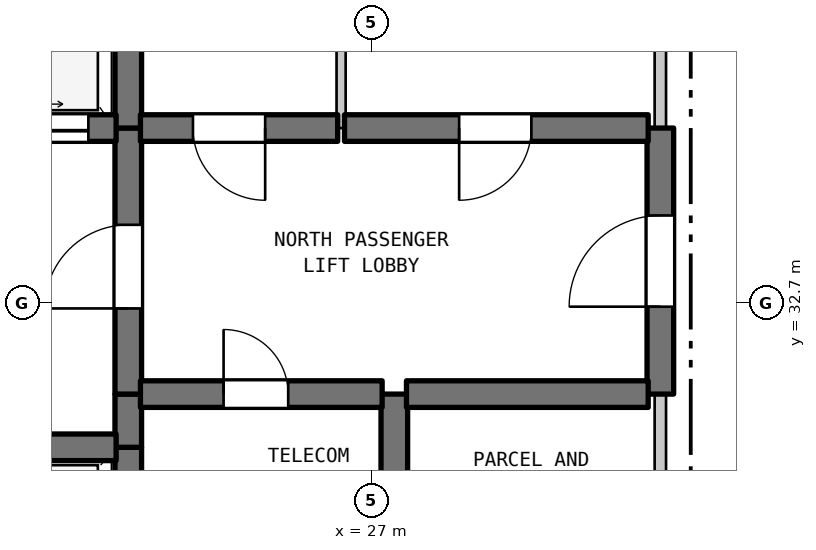
"""IFC4 building model, lengths in metres.
Left out: names, types, materials, properties, quantities, classifications, styles, units other than length and angle.
Written with IfcOpenShell. Run it as: python <this file> out.ifc"""

import sys

from ifc_helpers import new_model, si_unit, direction, frame, frame_2d, origin, place, context, subcontext, project, spatial, rectangle, extrude, element, fill, save


model = new_model("IFC4")
c1 = context("Model", 3, precision=1e-05, world=origin(), true_north=direction((0.0, 1.0)))
c2 = subcontext(c1, "Body", "Model", "MODEL_VIEW")
j1 = project(units=[si_unit("LENGTHUNIT", "METRE"), si_unit("PLANEANGLEUNIT", "RADIAN")], contexts=[c1])
p1 = place(None, origin())
s1 = spatial("IfcSite", under=j1, at=p1, CompositionType="ELEMENT")
p2 = place(p1, origin())
s2 = spatial("IfcBuilding", under=s1, at=p2, CompositionType="ELEMENT")
p3 = place(p2, frame((0.0, 0.0, 291.7)))
s3 = spatial("IfcBuildingStorey", under=s2, at=p3, CompositionType="ELEMENT", Elevation=291.7)
p4 = place(p3, frame((23.8, 28.2, 0.0), z_axis=(0.0, 0.0, 1.0), x_axis=(0.0, 1.0, 0.0)))
e1 = element("IfcWall", 1, at=p4, inside=s3, PredefinedType="SHEAR", context=c2, shape_type="SweptSolid", body=[
    extrude(rectangle(XDim=2.6, YDim=0.35, at=frame_2d((1.3, 0.0))), origin(), (0.0, 0.0, 1.0), 3.39),
])
p5 = place(p3, frame((23.8, 30.8, 0.0), z_axis=(0.0, 0.0, 1.0), x_axis=(0.0, 1.0, 0.0)))
e2 = element("IfcWall", 2, at=p5, inside=s3, PredefinedType="SHEAR", context=c2, shape_type="SweptSolid", body=[
    extrude(rectangle(XDim=0.7, YDim=0.35, at=frame_2d((0.35, 0.0))), origin(), (0.0, 0.0, 1.0), 3.39),
])
p6 = place(p3, frame((23.8, 31.5, 0.0), z_axis=(0.0, 0.0, 1.0), x_axis=(0.0, 1.0, 0.0)))
e3 = element("IfcWall", 3, at=p6, inside=s3, PredefinedType="SHEAR", context=c2, shape_type="SweptSolid", body=[
    extrude(rectangle(XDim=3.5, YDim=0.35, at=frame_2d((1.75, 0.0))), origin(), (0.0, 0.0, 1.0), 3.39),
])
p7 = place(p6, frame((1.127, 0.0, 0.0)))
e4 = element("IfcOpeningElement", 4, at=p7, cuts=e3, PredefinedType="OPENING", context=c2, shape_type="SweptSolid", body=[
    extrude(rectangle(XDim=1.1, YDim=2.15, at=frame_2d((0.55, 1.075))), frame((0.0, 0.185, 0.0), z_axis=(0.0, -1.0, 0.0), x_axis=(1.0, 0.0, 0.0)), (0.0, 0.0, 1.0), 0.37),
])
p8 = place(p3, frame((23.8, 35.0, 0.0), z_axis=(0.0, 0.0, 1.0), x_axis=(0.0, 1.0, 0.0)))
e5 = element("IfcWall", 5, at=p8, inside=s3, PredefinedType="SHEAR", context=c2, shape_type="SweptSolid", body=[
    extrude(rectangle(XDim=2.9, YDim=0.35, at=frame_2d((1.45, 0.0))), origin(), (0.0, 0.0, 1.0), 3.39),
])
p9 = place(p3, frame((26.6, 35.0, 0.0), z_axis=(0.0, 0.0, 1.0), x_axis=(0.0, 1.0, 0.0)))
e6 = element("IfcWall", 6, at=p9, inside=s3, PredefinedType="PARTITIONING", context=c2, shape_type="SweptSolid", body=[
    extrude(rectangle(XDim=2.9, YDim=0.12, at=frame_2d((1.45, 0.0))), origin(), (0.0, 0.0, 1.0), 3.39),
])
p10 = place(p3, frame((27.3, 28.9, 0.0), z_axis=(0.0, 0.0, 1.0), x_axis=(0.0, 1.0, 0.0)))
e7 = element("IfcWall", 7, at=p10, inside=s3, PredefinedType="SHEAR", context=c2, shape_type="SweptSolid", body=[
    extrude(rectangle(XDim=2.6, YDim=0.35, at=frame_2d((1.3, 0.0))), origin(), (0.0, 0.0, 1.0), 3.39),
])
p11 = place(p3, frame((30.8, 28.9, 0.0), z_axis=(0.0, 0.0, 1.0), x_axis=(0.0, 1.0, 0.0)))
e8 = element("IfcWall", 8, at=p11, inside=s3, PredefinedType="STANDARD", context=c2, shape_type="SweptSolid", body=[
    extrude(rectangle(XDim=2.6, YDim=0.15, at=frame_2d((1.3, 0.0))), origin(), (0.0, 0.0, 1.0), 3.39),
])
p12 = place(p3, frame((30.8, 31.5, 0.0), z_axis=(0.0, 0.0, 1.0), x_axis=(0.0, 1.0, 0.0)))
e9 = element("IfcWall", 9, at=p12, inside=s3, PredefinedType="SHEAR", context=c2, shape_type="SweptSolid", body=[
    extrude(rectangle(XDim=3.5, YDim=0.35, at=frame_2d((1.75, 0.0))), origin(), (0.0, 0.0, 1.0), 3.39),
])
p13 = place(p12, frame((1.15, 0.0, 0.0)))
e10 = element("IfcOpeningElement", 10, at=p13, cuts=e9, PredefinedType="OPENING", context=c2, shape_type="SweptSolid", body=[
    extrude(rectangle(XDim=1.2, YDim=2.2, at=frame_2d((0.6, 1.1))), frame((0.0, 0.185, 0.0), z_axis=(0.0, -1.0, 0.0), x_axis=(1.0, 0.0, 0.0)), (0.0, 0.0, 1.0), 0.37),
])
p14 = place(p3, frame((30.8, 35.0, 0.0), z_axis=(0.0, 0.0, 1.0), x_axis=(0.0, 1.0, 0.0)))
e11 = element("IfcWall", 11, at=p14, inside=s3, PredefinedType="STANDARD", context=c2, shape_type="SweptSolid", body=[
    extrude(rectangle(XDim=2.9, YDim=0.15, at=frame_2d((1.45, 0.0))), origin(), (0.0, 0.0, 1.0), 3.39),
])
p15 = place(p3, frame((19.16, 30.8, 0.0), z_axis=(0.0, 0.0, 1.0), x_axis=(1.0, 0.0, 0.0)))
e12 = element("IfcWall", 12, at=p15, inside=s3, PredefinedType="SHEAR", context=c2, shape_type="SweptSolid", body=[
    extrude(rectangle(XDim=4.48, YDim=0.35, at=frame_2d((2.24, 0.0))), origin(), (0.0, 0.0, 1.0), 3.39),
])
p16 = place(p3, frame((23.96, 31.5, 0.0), z_axis=(0.0, 0.0, 1.0), x_axis=(1.0, 0.0, 0.0)))
e13 = element("IfcWall", 13, at=p16, inside=s3, PredefinedType="SHEAR", context=c2, shape_type="SweptSolid", body=[
    extrude(rectangle(XDim=3.18, YDim=0.35, at=frame_2d((1.59, 0.0))), origin(), (0.0, 0.0, 1.0), 3.39),
])
p17 = place(p16, frame((1.094, 0.0, 0.0)))
e14 = element("IfcOpeningElement", 14, at=p17, cuts=e13, PredefinedType="OPENING", context=c2, shape_type="SweptSolid", body=[
    extrude(rectangle(XDim=0.85, YDim=2.1, at=frame_2d((0.425, 1.05))), frame((0.0, 0.185, 0.0), z_axis=(0.0, -1.0, 0.0), x_axis=(1.0, 0.0, 0.0)), (0.0, 0.0, 1.0), 0.37),
])
p18 = place(p3, frame((27.46, 31.5, 0.0), z_axis=(0.0, 0.0, 1.0), x_axis=(1.0, 0.0, 0.0)))
e15 = element("IfcWall", 15, at=p18, inside=s3, PredefinedType="SHEAR", context=c2, shape_type="SweptSolid", body=[
    extrude(rectangle(XDim=3.18, YDim=0.35, at=frame_2d((1.59, 0.0))), origin(), (0.0, 0.0, 1.0), 3.39),
])
p19 = place(p3, frame((19.16, 35.0, 0.0), z_axis=(0.0, 0.0, 1.0), x_axis=(1.0, 0.0, 0.0)))
e16 = element("IfcWall", 16, at=p19, inside=s3, PredefinedType="SHEAR", context=c2, shape_type="SweptSolid", body=[
    extrude(rectangle(XDim=4.48, YDim=0.35, at=frame_2d((2.24, 0.0))), origin(), (0.0, 0.0, 1.0), 3.39),
])
p20 = place(p19, frame((0.365, 0.0, 0.0)))
e17 = element("IfcOpeningElement", 17, at=p20, cuts=e16, PredefinedType="OPENING", context=c2, shape_type="SweptSolid", body=[
    extrude(rectangle(XDim=1.35, YDim=2.2, at=frame_2d((0.675, 1.1))), frame((0.0, 0.185, 0.0), z_axis=(0.0, -1.0, 0.0), x_axis=(1.0, 0.0, 0.0)), (0.0, 0.0, 1.0), 0.37),
])
p21 = place(p19, frame((2.765, 0.0, 0.0)))
e18 = element("IfcOpeningElement", 18, at=p21, cuts=e16, PredefinedType="OPENING", context=c2, shape_type="SweptSolid", body=[
    extrude(rectangle(XDim=1.35, YDim=2.2, at=frame_2d((0.675, 1.1))), frame((0.0, 0.185, 0.0), z_axis=(0.0, -1.0, 0.0), x_axis=(1.0, 0.0, 0.0)), (0.0, 0.0, 1.0), 0.37),
])
p22 = place(p3, frame((23.96, 35.0, 0.0), z_axis=(0.0, 0.0, 1.0), x_axis=(1.0, 0.0, 0.0)))
e19 = element("IfcWall", 19, at=p22, inside=s3, PredefinedType="SHEAR", context=c2, shape_type="SweptSolid", body=[
    extrude(rectangle(XDim=2.595, YDim=0.35, at=frame_2d((1.297, 0.0))), origin(), (0.0, 0.0, 1.0), 3.39),
])
p23 = place(p22, frame((0.691, 0.0, 0.0)))
e20 = element("IfcOpeningElement", 20, at=p23, cuts=e19, PredefinedType="OPENING", context=c2, shape_type="SweptSolid", body=[
    extrude(rectangle(XDim=0.95, YDim=2.15, at=frame_2d((0.475, 1.075))), frame((0.0, 0.185, 0.0), z_axis=(0.0, -1.0, 0.0), x_axis=(1.0, 0.0, 0.0)), (0.0, 0.0, 1.0), 0.37),
])
p24 = place(p3, frame((26.645, 35.0, 0.0), z_axis=(0.0, 0.0, 1.0), x_axis=(1.0, 0.0, 0.0)))
e21 = element("IfcWall", 21, at=p24, inside=s3, PredefinedType="SHEAR", context=c2, shape_type="SweptSolid", body=[
    extrude(rectangle(XDim=3.995, YDim=0.35, at=frame_2d((1.998, 0.0))), origin(), (0.0, 0.0, 1.0), 3.39),
])
p25 = place(p24, frame((1.508, 0.0, 0.0)))
e22 = element("IfcOpeningElement", 22, at=p25, cuts=e21, PredefinedType="OPENING", context=c2, shape_type="SweptSolid", body=[
    extrude(rectangle(XDim=0.95, YDim=2.15, at=frame_2d((0.475, 1.075))), frame((0.0, 0.185, 0.0), z_axis=(0.0, -1.0, 0.0), x_axis=(1.0, 0.0, 0.0)), (0.0, 0.0, 1.0), 0.37),
])
p26 = place(p7, origin())
e23 = element("IfcDoor", 23, at=p26, inside=s3, OperationType="SINGLE_SWING_LEFT", PredefinedType="DOOR", context=c2, shape_type="SweptSolid", body=[
    extrude(rectangle(XDim=1.1, YDim=2.15, at=frame_2d((0.55, 1.075))), frame((0.0, 0.025, 0.0), z_axis=(0.0, -1.0, 0.0), x_axis=(1.0, 0.0, 0.0)), (0.0, 0.0, 1.0), 0.05),
])
fill(e4, e23)
p27 = place(p13, origin())
e24 = element("IfcDoor", 24, at=p27, inside=s3, OperationType="SINGLE_SWING_LEFT", PredefinedType="DOOR", context=c2, shape_type="SweptSolid", body=[
    extrude(rectangle(XDim=1.2, YDim=2.2, at=frame_2d((0.6, 1.1))), frame((0.0, 0.025, 0.0), z_axis=(0.0, -1.0, 0.0), x_axis=(1.0, 0.0, 0.0)), (0.0, 0.0, 1.0), 0.05),
])
fill(e10, e24)
p28 = place(p17, origin())
e25 = element("IfcDoor", 25, at=p28, inside=s3, OperationType="SINGLE_SWING_LEFT", PredefinedType="DOOR", context=c2, shape_type="SweptSolid", body=[
    extrude(rectangle(XDim=0.85, YDim=2.1, at=frame_2d((0.425, 1.05))), frame((0.0, 0.025, 0.0), z_axis=(0.0, -1.0, 0.0), x_axis=(1.0, 0.0, 0.0)), (0.0, 0.0, 1.0), 0.05),
])
fill(e14, e25)
p29 = place(p21, origin())
e26 = element("IfcDoor", 26, at=p29, inside=s3, OperationType="DOUBLE_DOOR_SLIDING", PredefinedType="DOOR", context=c2, shape_type="SweptSolid", body=[
    extrude(rectangle(XDim=1.35, YDim=2.2, at=frame_2d((0.675, 1.1))), frame((0.0, 0.025, 0.0), z_axis=(0.0, -1.0, 0.0), x_axis=(1.0, 0.0, 0.0)), (0.0, 0.0, 1.0), 0.05),
])
fill(e18, e26)
p30 = place(p23, frame((0.95, 0.0, 0.0), z_axis=(0.0, 0.0, 1.0), x_axis=(-1.0, 0.0, 0.0)))
e27 = element("IfcDoor", 27, at=p30, inside=s3, OperationType="SINGLE_SWING_RIGHT", PredefinedType="DOOR", context=c2, shape_type="SweptSolid", body=[
    extrude(rectangle(XDim=0.95, YDim=2.15, at=frame_2d((0.475, 1.075))), frame((0.0, 0.025, 0.0), z_axis=(0.0, -1.0, 0.0), x_axis=(1.0, 0.0, 0.0)), (0.0, 0.0, 1.0), 0.05),
])
fill(e20, e27)
p31 = place(p25, frame((0.95, 0.0, 0.0), z_axis=(0.0, 0.0, 1.0), x_axis=(-1.0, 0.0, 0.0)))
e28 = element("IfcDoor", 28, at=p31, inside=s3, OperationType="SINGLE_SWING_LEFT", PredefinedType="DOOR", context=c2, shape_type="SweptSolid", body=[
    extrude(rectangle(XDim=0.95, YDim=2.15, at=frame_2d((0.475, 1.075))), frame((0.0, 0.025, 0.0), z_axis=(0.0, -1.0, 0.0), x_axis=(1.0, 0.0, 0.0)), (0.0, 0.0, 1.0), 0.05),
])
fill(e22, e28)
save(model, sys.argv[1])
